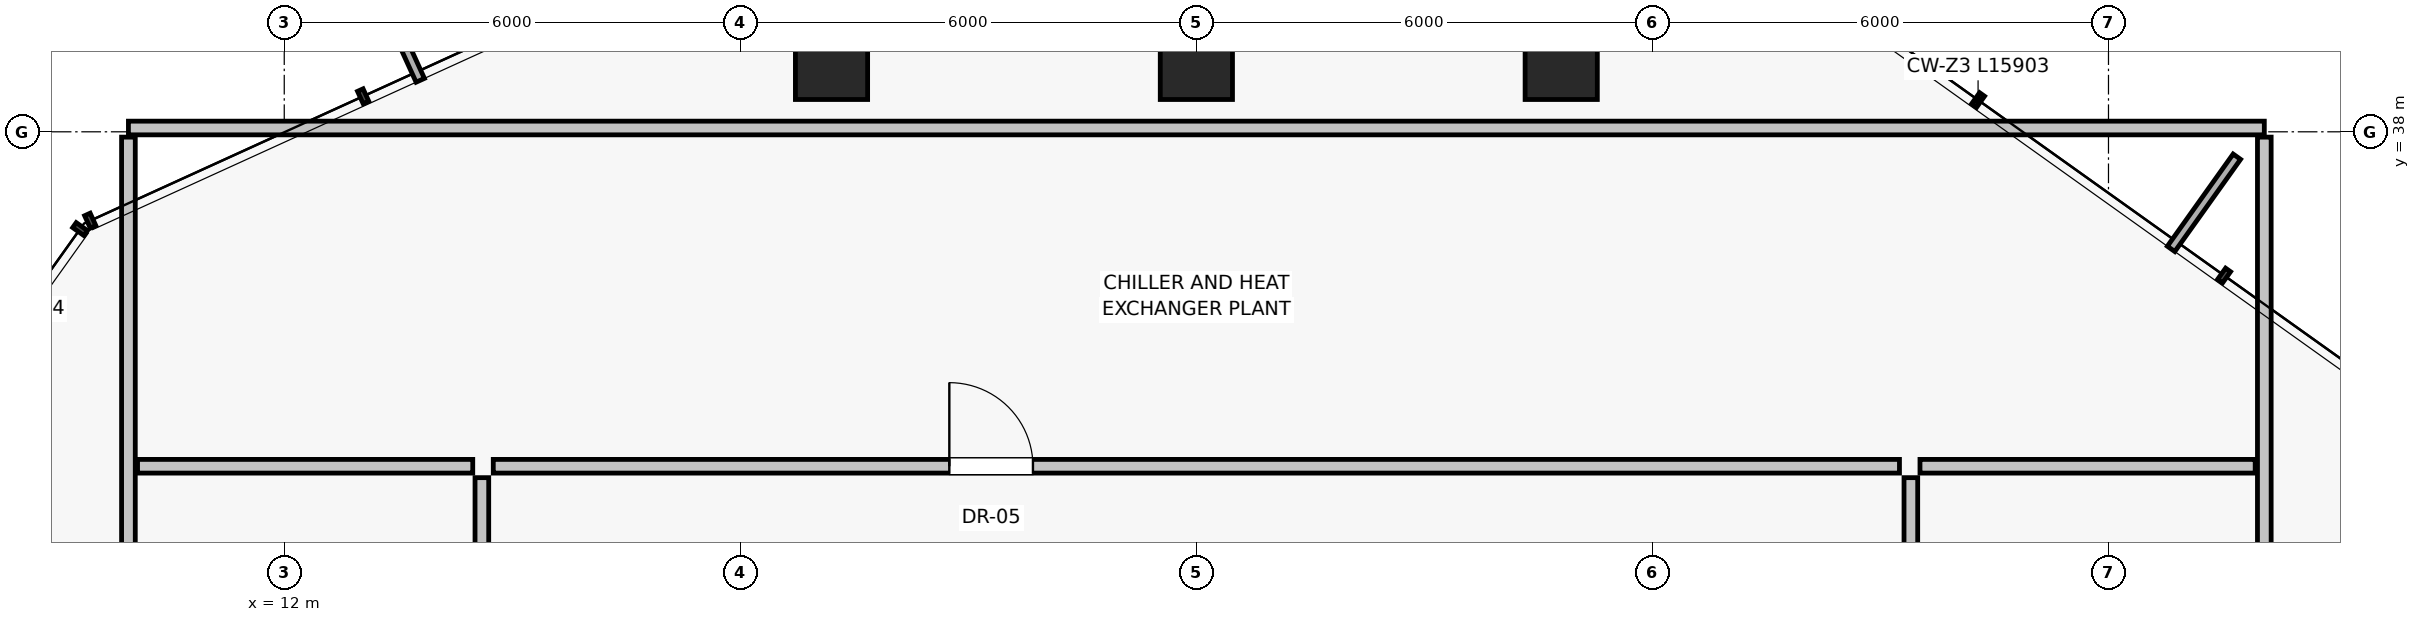
"""IFC4 building model, lengths in metres.
Left out: names, types, materials, properties, quantities, classifications, styles, units other than length and angle.
Written with IfcOpenShell. Run it as: python <this file> out.ifc"""

import sys

from ifc_helpers import new_model, si_unit, direction, frame, frame_2d, origin, origin_2d, place, context, subcontext, project, spatial, rectangle, extrude, source, transform, mapped, element, fill, save


model = new_model("IFC4")
c1 = context("Model", 3, precision=1e-05, world=origin(), true_north=direction((0.0, 1.0)))
c2 = subcontext(c1, "Body", "Model", "MODEL_VIEW")
j1 = project(units=[si_unit("LENGTHUNIT", "METRE"), si_unit("PLANEANGLEUNIT", "RADIAN")], contexts=[c1])
p1 = place(None, origin())
s1 = spatial("IfcSite", under=j1, at=p1, CompositionType="ELEMENT")
p2 = place(p1, origin())
s2 = spatial("IfcBuilding", under=s1, at=p2, CompositionType="ELEMENT")
p3 = place(p2, frame((0.0, 0.0, 225.4)))
s3 = spatial("IfcBuildingStorey", under=s2, at=p3, CompositionType="ELEMENT", Elevation=225.4)
for number, where, z_axis, x_axis in (
    (1, (28.8, 38.9, 0.0), (0.0, 0.0, 1.0), (1.0, 0.0, 0.0)),
    (2, (24.0, 38.9, 0.0), (0.0, 0.0, 1.0), (1.0, 0.0, 0.0)),
    (3, (19.2, 38.9, 0.0), (0.0, 0.0, 1.0), (1.0, 0.0, 0.0)),
):
    element("IfcColumn", number, at=place(p3, frame(where, z_axis=z_axis, x_axis=x_axis)), inside=s3, PredefinedType="COLUMN", context=c2, shape_type="SweptSolid", body=[
        extrude(rectangle(XDim=0.95, YDim=0.95, at=origin_2d()), origin(), (0.0, 0.0, 1.0), 4.65),
    ])
p4 = place(p3, frame((33.4, 14.35, 0.0), z_axis=(0.0, 0.0, 1.0), x_axis=(0.0, 1.0, 0.0)))
e4 = element("IfcWall", 4, at=p4, inside=s3, PredefinedType="PARTITIONING", context=c2, shape_type="SweptSolid", body=[
    extrude(rectangle(XDim=19.1, YDim=0.18, at=frame_2d((9.55, 0.0))), origin(), (0.0, 0.0, 1.0), 4.415),
])
p5 = place(p4, frame((6.0, 0.0, 0.0)))
e5 = element("IfcOpeningElement", 5, at=p5, cuts=e4, PredefinedType="OPENING", context=c2, shape_type="SweptSolid", body=[
    extrude(rectangle(XDim=1.3, YDim=2.3, at=frame_2d((0.65, 1.15))), frame((0.0, 0.1, 0.0), z_axis=(0.0, -1.0, 0.0), x_axis=(1.0, 0.0, 0.0)), (0.0, 0.0, 1.0), 0.2),
])
p6 = place(p3, frame((14.75, 33.6, 0.0), z_axis=(0.0, 0.0, 1.0), x_axis=(1.0, 0.0, 0.0)))
e6 = element("IfcWall", 6, at=p6, inside=s3, PredefinedType="PARTITIONING", context=c2, shape_type="SweptSolid", body=[
    extrude(rectangle(XDim=18.5, YDim=0.18, at=frame_2d((9.25, 0.0))), origin(), (0.0, 0.0, 1.0), 4.415),
])
p7 = place(p6, frame((6.0, 0.0, 0.0)))
e7 = element("IfcOpeningElement", 7, at=p7, cuts=e6, PredefinedType="OPENING", context=c2, shape_type="SweptSolid", body=[
    extrude(rectangle(XDim=1.1, YDim=2.03, at=frame_2d((0.55, 1.015))), frame((0.0, 0.1, 0.0), z_axis=(0.0, -1.0, 0.0), x_axis=(1.0, 0.0, 0.0)), (0.0, 0.0, 1.0), 0.2),
])
p8 = place(p3, frame((14.6, 14.35, 0.0), z_axis=(0.0, 0.0, 1.0), x_axis=(0.0, 1.0, 0.0)))
e8 = element("IfcWall", 8, at=p8, inside=s3, PredefinedType="PARTITIONING", context=c2, shape_type="SweptSolid", body=[
    extrude(rectangle(XDim=19.1, YDim=0.18, at=frame_2d((9.55, 0.0))), origin(), (0.0, 0.0, 1.0), 4.415),
])
p9 = place(p8, frame((6.0, 0.0, 0.0)))
e9 = element("IfcOpeningElement", 9, at=p9, cuts=e8, PredefinedType="OPENING", context=c2, shape_type="SweptSolid", body=[
    extrude(rectangle(XDim=1.3, YDim=2.3, at=frame_2d((0.65, 1.15))), frame((0.0, 0.1, 0.0), z_axis=(0.0, -1.0, 0.0), x_axis=(1.0, 0.0, 0.0)), (0.0, 0.0, 1.0), 0.2),
])
p10 = place(p3, frame((9.95, 38.05, 0.0), z_axis=(0.0, 0.0, 1.0), x_axis=(1.0, 0.0, 0.0)))
e10 = element("IfcWall", 10, at=p10, inside=s3, PredefinedType="PARTITIONING", context=c2, shape_type="SweptSolid", body=[
    extrude(rectangle(XDim=28.1, YDim=0.18, at=frame_2d((14.05, 0.0))), origin(), (0.0, 0.0, 1.0), 4.415),
])
for number, where, z_axis, x_axis in (
    (11, (9.95, 10.07, 0.0), (0.0, 0.0, 1.0), (0.0, 1.0, 0.0)),
    (12, (38.05, 10.07, 0.0), (0.0, 0.0, 1.0), (0.0, 1.0, 0.0)),
):
    element("IfcWall", number, at=place(p3, frame(where, z_axis=z_axis, x_axis=x_axis)), inside=s3, PredefinedType="PARTITIONING", context=c2, shape_type="SweptSolid", body=[
        extrude(rectangle(XDim=27.86, YDim=0.18, at=frame_2d((13.93, 0.0))), origin(), (0.0, 0.0, 1.0), 2.215),
    ])
for number, where, z_axis, x_axis in (
    (13, (10.07, 33.6, 0.0), (0.0, 0.0, 1.0), (1.0, 0.0, 0.0)),
    (14, (33.52, 33.6, 0.0), (0.0, 0.0, 1.0), (1.0, 0.0, 0.0)),
):
    element("IfcWall", number, at=place(p3, frame(where, z_axis=z_axis, x_axis=x_axis)), inside=s3, PredefinedType="PARTITIONING", context=c2, shape_type="SweptSolid", body=[
        extrude(rectangle(XDim=4.41, YDim=0.18, at=frame_2d((2.205, 0.0))), origin(), (0.0, 0.0, 1.0), 4.415),
    ])
m1 = source(origin(), c2, "Body", "SweptSolid", [
    extrude(rectangle(XDim=1.1, YDim=2.03, at=frame_2d((0.55, 1.015))), frame((0.0, 0.025, 0.0), z_axis=(0.0, -1.0, 0.0), x_axis=(1.0, 0.0, 0.0)), (0.0, 0.0, 1.0), 0.05),
])
p11 = place(p7, origin())
e15 = element("IfcDoor", 15, at=p11, inside=s3, OperationType="SINGLE_SWING_LEFT", PredefinedType="DOOR", context=c2, shape_type="MappedRepresentation", body=[
    mapped(m1, transform((0.0, 0.0, 0.0), scale=1.0)),
])
fill(e7, e15)
save(model, sys.argv[1])
